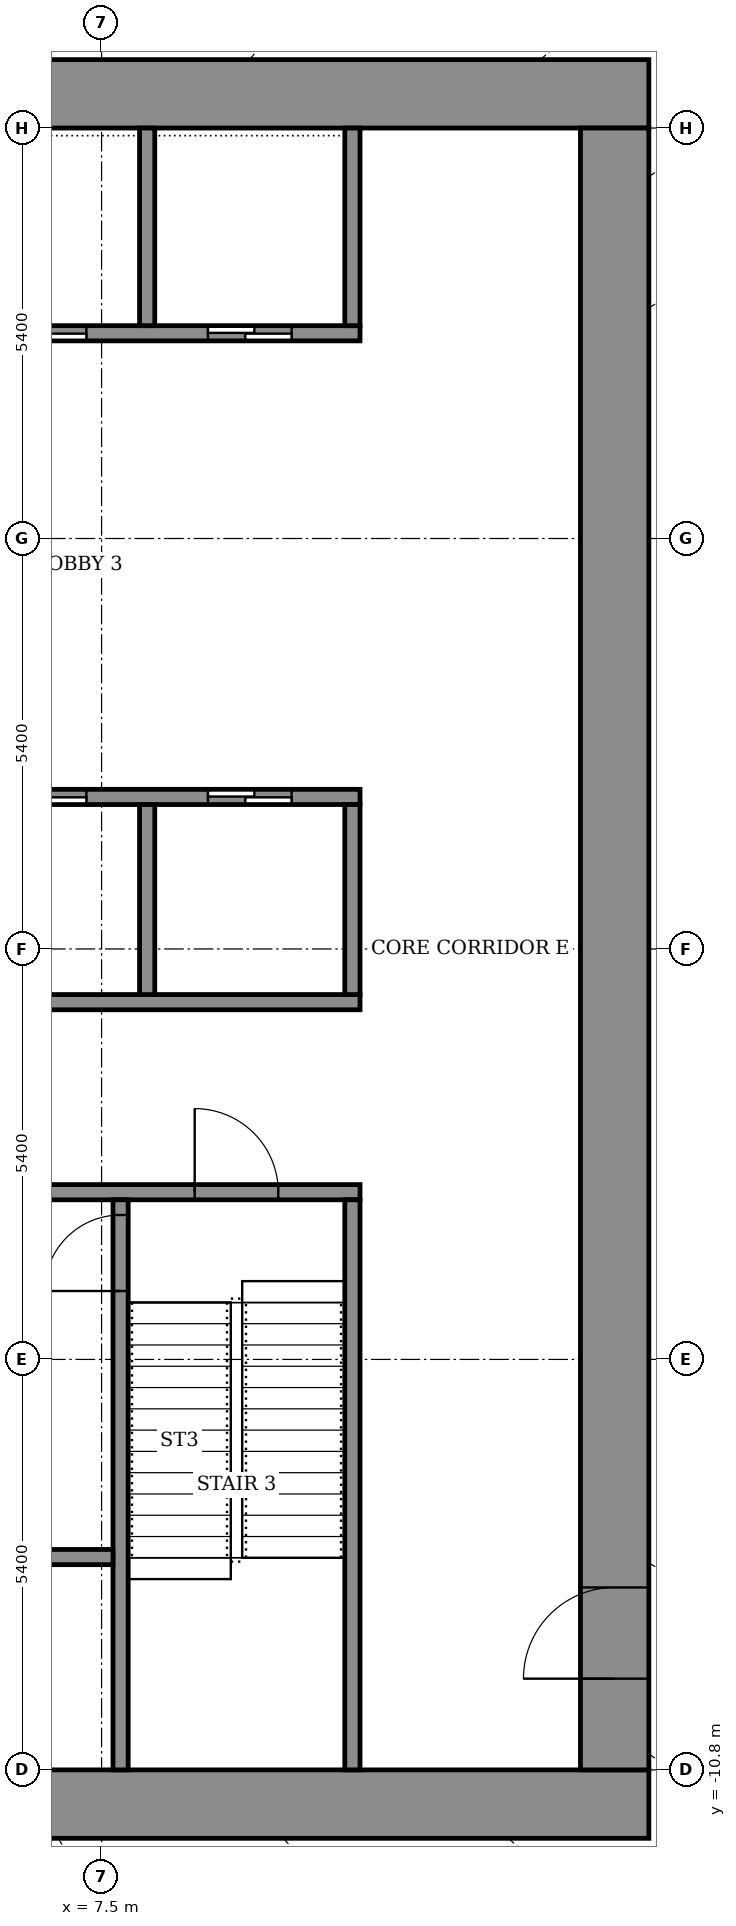
"""IFC4 building model, lengths in metres.
Left out: names, types, materials, properties, quantities, classifications, styles, units other than length and angle.
Written with IfcOpenShell. Run it as: python <this file> out.ifc"""

import sys

from ifc_helpers import new_model, si_unit, direction, frame, frame_2d, origin, place, context, subcontext, project, spatial, rectangle, extrude, element, fill, save


model = new_model("IFC4")
c1 = context("Model", 3, precision=1e-05, world=origin(), true_north=direction((0.0, 1.0)))
c2 = subcontext(c1, "Body", "Model", "MODEL_VIEW")
j1 = project(units=[si_unit("LENGTHUNIT", "METRE"), si_unit("PLANEANGLEUNIT", "RADIAN")], contexts=[c1])
p1 = place(None, origin())
s1 = spatial("IfcSite", under=j1, at=p1, CompositionType="ELEMENT")
p2 = place(p1, origin())
s2 = spatial("IfcBuilding", under=s1, at=p2, CompositionType="ELEMENT")
p3 = place(p2, frame((0.0, 0.0, 148.1)))
s3 = spatial("IfcBuildingStorey", under=s2, at=p3, CompositionType="ELEMENT", Elevation=148.1)
for number, where, z_axis, x_axis in (
    (1, (-14.7, -11.25, 0.0), (0.0, 0.0, 1.0), (1.0, 0.0, 0.0)),
    (2, (-14.7, 11.25, 0.0), (0.0, 0.0, 1.0), (1.0, 0.0, 0.0)),
):
    element("IfcWall", number, at=place(p3, frame(where, z_axis=z_axis, x_axis=x_axis)), inside=s3, PredefinedType="SHEAR", context=c2, shape_type="SweptSolid", body=[
        extrude(rectangle(XDim=29.4, YDim=0.9, at=frame_2d((14.7, 0.0))), origin(), (0.0, 0.0, 1.0), 4.6),
    ])
p4 = place(p3, frame((14.25, -10.8, 0.0), z_axis=(0.0, 0.0, 1.0), x_axis=(0.0, 1.0, 0.0)))
e3 = element("IfcWall", 3, at=p4, inside=s3, PredefinedType="SHEAR", context=c2, shape_type="SweptSolid", body=[
    extrude(rectangle(XDim=21.6, YDim=0.9, at=frame_2d((10.8, 0.0))), origin(), (0.0, 0.0, 1.0), 4.6),
])
p5 = place(p4, frame((1.2, 0.0, 0.0)))
e4 = element("IfcOpeningElement", 4, at=p5, cuts=e3, PredefinedType="OPENING", context=c2, shape_type="SweptSolid", body=[
    extrude(rectangle(XDim=1.2, YDim=2.1, at=frame_2d((0.6, 1.05))), frame((0.0, 0.46, 0.0), z_axis=(0.0, -1.0, 0.0), x_axis=(1.0, 0.0, 0.0)), (0.0, 0.0, 1.0), 0.92),
])
p6 = place(p3, frame((-10.9, -3.2, 0.0), z_axis=(0.0, 0.0, 1.0), x_axis=(1.0, 0.0, 0.0)))
e5 = element("IfcWall", 5, at=p6, inside=s3, PredefinedType="SHEAR", context=c2, shape_type="SweptSolid", body=[
    extrude(rectangle(XDim=21.8, YDim=0.2, at=frame_2d((10.9, 0.0))), origin(), (0.0, 0.0, 1.0), 4.05),
])
p7 = place(p6, frame((1.075, 0.0, 0.0)))
e6 = element("IfcOpeningElement", 6, at=p7, cuts=e5, PredefinedType="OPENING", context=c2, shape_type="SweptSolid", body=[
    extrude(rectangle(XDim=1.1, YDim=2.1, at=frame_2d((0.55, 1.05))), frame((0.0, 0.11, 0.0), z_axis=(0.0, -1.0, 0.0), x_axis=(1.0, 0.0, 0.0)), (0.0, 0.0, 1.0), 0.22),
])
p8 = place(p6, frame((10.325, 0.0, 0.0)))
e7 = element("IfcOpeningElement", 7, at=p8, cuts=e5, PredefinedType="OPENING", context=c2, shape_type="SweptSolid", body=[
    extrude(rectangle(XDim=1.1, YDim=2.1, at=frame_2d((0.55, 1.05))), frame((0.0, 0.11, 0.0), z_axis=(0.0, -1.0, 0.0), x_axis=(1.0, 0.0, 0.0)), (0.0, 0.0, 1.0), 0.22),
])
p9 = place(p6, frame((19.625, 0.0, 0.0)))
e8 = element("IfcOpeningElement", 8, at=p9, cuts=e5, PredefinedType="OPENING", context=c2, shape_type="SweptSolid", body=[
    extrude(rectangle(XDim=1.1, YDim=2.1, at=frame_2d((0.55, 1.05))), frame((0.0, 0.11, 0.0), z_axis=(0.0, -1.0, 0.0), x_axis=(1.0, 0.0, 0.0)), (0.0, 0.0, 1.0), 0.22),
])
p10 = place(p6, frame((5.7, 0.0, 0.0)))
e9 = element("IfcOpeningElement", 9, at=p10, cuts=e5, PredefinedType="OPENING", context=c2, shape_type="SweptSolid", body=[
    extrude(rectangle(XDim=1.1, YDim=2.1, at=frame_2d((0.55, 1.05))), frame((0.0, 0.11, 0.0), z_axis=(0.0, -1.0, 0.0), x_axis=(1.0, 0.0, 0.0)), (0.0, 0.0, 1.0), 0.22),
])
p11 = place(p6, frame((14.975, 0.0, 0.0)))
e10 = element("IfcOpeningElement", 10, at=p11, cuts=e5, PredefinedType="OPENING", context=c2, shape_type="SweptSolid", body=[
    extrude(rectangle(XDim=1.1, YDim=2.1, at=frame_2d((0.55, 1.05))), frame((0.0, 0.11, 0.0), z_axis=(0.0, -1.0, 0.0), x_axis=(1.0, 0.0, 0.0)), (0.0, 0.0, 1.0), 0.22),
])
p12 = place(p3, frame((-10.9, -0.7, 0.0), z_axis=(0.0, 0.0, 1.0), x_axis=(1.0, 0.0, 0.0)))
e11 = element("IfcWall", 11, at=p12, inside=s3, PredefinedType="SHEAR", context=c2, shape_type="SweptSolid", body=[
    extrude(rectangle(XDim=21.8, YDim=0.2, at=frame_2d((10.9, 0.0))), origin(), (0.0, 0.0, 1.0), 4.05),
])
p13 = place(p3, frame((-10.9, 2.0, 0.0), z_axis=(0.0, 0.0, 1.0), x_axis=(1.0, 0.0, 0.0)))
e12 = element("IfcWall", 12, at=p13, inside=s3, PredefinedType="SHEAR", context=c2, shape_type="SweptSolid", body=[
    extrude(rectangle(XDim=21.8, YDim=0.2, at=frame_2d((10.9, 0.0))), origin(), (0.0, 0.0, 1.0), 4.05),
])
p14 = place(p13, frame((14.4, 0.0, 0.0)))
e13 = element("IfcOpeningElement", 13, at=p14, cuts=e12, PredefinedType="OPENING", context=c2, shape_type="SweptSolid", body=[
    extrude(rectangle(XDim=1.1, YDim=2.1, at=frame_2d((0.55, 1.05))), frame((0.0, 0.11, 0.0), z_axis=(0.0, -1.0, 0.0), x_axis=(1.0, 0.0, 0.0)), (0.0, 0.0, 1.0), 0.22),
])
p15 = place(p13, frame((17.1, 0.0, 0.0)))
e14 = element("IfcOpeningElement", 14, at=p15, cuts=e12, PredefinedType="OPENING", context=c2, shape_type="SweptSolid", body=[
    extrude(rectangle(XDim=1.1, YDim=2.1, at=frame_2d((0.55, 1.05))), frame((0.0, 0.11, 0.0), z_axis=(0.0, -1.0, 0.0), x_axis=(1.0, 0.0, 0.0)), (0.0, 0.0, 1.0), 0.22),
])
p16 = place(p13, frame((19.8, 0.0, 0.0)))
e15 = element("IfcOpeningElement", 15, at=p16, cuts=e12, PredefinedType="OPENING", context=c2, shape_type="SweptSolid", body=[
    extrude(rectangle(XDim=1.1, YDim=2.1, at=frame_2d((0.55, 1.05))), frame((0.0, 0.11, 0.0), z_axis=(0.0, -1.0, 0.0), x_axis=(1.0, 0.0, 0.0)), (0.0, 0.0, 1.0), 0.22),
])
p17 = place(p13, frame((2.35, 0.0, 0.0)))
e16 = element("IfcOpeningElement", 16, at=p17, cuts=e12, PredefinedType="OPENING", context=c2, shape_type="SweptSolid", body=[
    extrude(rectangle(XDim=0.9, YDim=2.1, at=frame_2d((0.45, 1.05))), frame((0.0, 0.11, 0.0), z_axis=(0.0, -1.0, 0.0), x_axis=(1.0, 0.0, 0.0)), (0.0, 0.0, 1.0), 0.22),
])
p18 = place(p13, frame((9.1, 0.0, 0.0)))
e17 = element("IfcOpeningElement", 17, at=p18, cuts=e12, PredefinedType="OPENING", context=c2, shape_type="SweptSolid", body=[
    extrude(rectangle(XDim=0.9, YDim=2.1, at=frame_2d((0.45, 1.05))), frame((0.0, 0.11, 0.0), z_axis=(0.0, -1.0, 0.0), x_axis=(1.0, 0.0, 0.0)), (0.0, 0.0, 1.0), 0.22),
])
p19 = place(p3, frame((-10.9, 8.1, 0.0), z_axis=(0.0, 0.0, 1.0), x_axis=(1.0, 0.0, 0.0)))
e18 = element("IfcWall", 18, at=p19, inside=s3, PredefinedType="SHEAR", context=c2, shape_type="SweptSolid", body=[
    extrude(rectangle(XDim=21.8, YDim=0.2, at=frame_2d((10.9, 0.0))), origin(), (0.0, 0.0, 1.0), 4.05),
])
p20 = place(p19, frame((14.4, 0.0, 0.0)))
e19 = element("IfcOpeningElement", 19, at=p20, cuts=e18, PredefinedType="OPENING", context=c2, shape_type="SweptSolid", body=[
    extrude(rectangle(XDim=1.1, YDim=2.1, at=frame_2d((0.55, 1.05))), frame((0.0, 0.11, 0.0), z_axis=(0.0, -1.0, 0.0), x_axis=(1.0, 0.0, 0.0)), (0.0, 0.0, 1.0), 0.22),
])
p21 = place(p19, frame((17.1, 0.0, 0.0)))
e20 = element("IfcOpeningElement", 20, at=p21, cuts=e18, PredefinedType="OPENING", context=c2, shape_type="SweptSolid", body=[
    extrude(rectangle(XDim=1.1, YDim=2.1, at=frame_2d((0.55, 1.05))), frame((0.0, 0.11, 0.0), z_axis=(0.0, -1.0, 0.0), x_axis=(1.0, 0.0, 0.0)), (0.0, 0.0, 1.0), 0.22),
])
p22 = place(p19, frame((19.8, 0.0, 0.0)))
e21 = element("IfcOpeningElement", 21, at=p22, cuts=e18, PredefinedType="OPENING", context=c2, shape_type="SweptSolid", body=[
    extrude(rectangle(XDim=1.1, YDim=2.1, at=frame_2d((0.55, 1.05))), frame((0.0, 0.11, 0.0), z_axis=(0.0, -1.0, 0.0), x_axis=(1.0, 0.0, 0.0)), (0.0, 0.0, 1.0), 0.22),
])
p23 = place(p19, frame((2.35, 0.0, 0.0)))
e22 = element("IfcOpeningElement", 22, at=p23, cuts=e18, PredefinedType="OPENING", context=c2, shape_type="SweptSolid", body=[
    extrude(rectangle(XDim=0.9, YDim=2.1, at=frame_2d((0.45, 1.05))), frame((0.0, 0.11, 0.0), z_axis=(0.0, -1.0, 0.0), x_axis=(1.0, 0.0, 0.0)), (0.0, 0.0, 1.0), 0.22),
])
p24 = place(p19, frame((9.1, 0.0, 0.0)))
e23 = element("IfcOpeningElement", 23, at=p24, cuts=e18, PredefinedType="OPENING", context=c2, shape_type="SweptSolid", body=[
    extrude(rectangle(XDim=0.9, YDim=2.1, at=frame_2d((0.45, 1.05))), frame((0.0, 0.11, 0.0), z_axis=(0.0, -1.0, 0.0), x_axis=(1.0, 0.0, 0.0)), (0.0, 0.0, 1.0), 0.22),
])
p25 = place(p3, frame((7.75, -10.8, 0.0), z_axis=(0.0, 0.0, 1.0), x_axis=(0.0, 1.0, 0.0)))
e24 = element("IfcWall", 24, at=p25, inside=s3, PredefinedType="SHEAR", context=c2, shape_type="SweptSolid", body=[
    extrude(rectangle(XDim=7.5, YDim=0.2, at=frame_2d((3.75, 0.0))), origin(), (0.0, 0.0, 1.0), 4.05),
])
p26 = place(p25, frame((6.3, 0.0, 0.0)))
e25 = element("IfcOpeningElement", 25, at=p26, cuts=e24, PredefinedType="OPENING", context=c2, shape_type="SweptSolid", body=[
    extrude(rectangle(XDim=1.0, YDim=2.1, at=frame_2d((0.5, 1.05))), frame((0.0, 0.11, 0.0), z_axis=(0.0, -1.0, 0.0), x_axis=(1.0, 0.0, 0.0)), (0.0, 0.0, 1.0), 0.22),
])
p27 = place(p3, frame((10.8, -10.8, 0.0), z_axis=(0.0, 0.0, 1.0), x_axis=(0.0, 1.0, 0.0)))
e26 = element("IfcWall", 26, at=p27, inside=s3, PredefinedType="SHEAR", context=c2, shape_type="SweptSolid", body=[
    extrude(rectangle(XDim=7.5, YDim=0.2, at=frame_2d((3.75, 0.0))), origin(), (0.0, 0.0, 1.0), 4.05),
])
p28 = place(p3, frame((1.6, -8.0, 0.0), z_axis=(0.0, 0.0, 1.0), x_axis=(1.0, 0.0, 0.0)))
e27 = element("IfcWall", 27, at=p28, inside=s3, PredefinedType="SHEAR", context=c2, shape_type="SweptSolid", body=[
    extrude(rectangle(XDim=6.05, YDim=0.2, at=frame_2d((3.025, 0.0))), origin(), (0.0, 0.0, 1.0), 4.05),
])
p29 = place(p28, frame((0.913, 0.0, 0.0)))
e28 = element("IfcOpeningElement", 28, at=p29, cuts=e27, PredefinedType="OPENING", context=c2, shape_type="SweptSolid", body=[
    extrude(rectangle(XDim=1.1, YDim=2.1, at=frame_2d((0.55, 1.05))), frame((0.0, 0.11, 0.0), z_axis=(0.0, -1.0, 0.0), x_axis=(1.0, 0.0, 0.0)), (0.0, 0.0, 1.0), 0.22),
])
p30 = place(p28, frame((4.038, 0.0, 0.0)))
e29 = element("IfcOpeningElement", 29, at=p30, cuts=e27, PredefinedType="OPENING", context=c2, shape_type="SweptSolid", body=[
    extrude(rectangle(XDim=1.1, YDim=2.1, at=frame_2d((0.55, 1.05))), frame((0.0, 0.11, 0.0), z_axis=(0.0, -1.0, 0.0), x_axis=(1.0, 0.0, 0.0)), (0.0, 0.0, 1.0), 0.22),
])
for number, where, z_axis, x_axis in (
    (30, (8.1, -0.6, 0.0), (0.0, 0.0, 1.0), (0.0, 1.0, 0.0)),
    (31, (10.8, -0.6, 0.0), (0.0, 0.0, 1.0), (0.0, 1.0, 0.0)),
):
    element("IfcWall", number, at=place(p3, frame(where, z_axis=z_axis, x_axis=x_axis)), inside=s3, PredefinedType="SHEAR", context=c2, shape_type="SweptSolid", body=[
        extrude(rectangle(XDim=2.5, YDim=0.2, at=frame_2d((1.25, 0.0))), origin(), (0.0, 0.0, 1.0), 4.05),
    ])
for number, where, z_axis, x_axis in (
    (32, (8.1, 8.2, 0.0), (0.0, 0.0, 1.0), (0.0, 1.0, 0.0)),
    (33, (10.8, 8.2, 0.0), (0.0, 0.0, 1.0), (0.0, 1.0, 0.0)),
):
    element("IfcWall", number, at=place(p3, frame(where, z_axis=z_axis, x_axis=x_axis)), inside=s3, PredefinedType="SHEAR", context=c2, shape_type="SweptSolid", body=[
        extrude(rectangle(XDim=2.6, YDim=0.2, at=frame_2d((1.3, 0.0))), origin(), (0.0, 0.0, 1.0), 4.05),
    ])
p31 = place(p5, origin())
e34 = element("IfcDoor", 34, at=p31, inside=s3, OperationType="DOUBLE_DOOR_SINGLE_SWING", PredefinedType="DOOR", context=c2, shape_type="SweptSolid", body=[
    extrude(rectangle(XDim=1.2, YDim=2.1, at=frame_2d((0.6, 1.05))), frame((0.0, 0.025, 0.0), z_axis=(0.0, -1.0, 0.0), x_axis=(1.0, 0.0, 0.0)), (0.0, 0.0, 1.0), 0.05),
])
fill(e4, e34)
p32 = place(p15, origin())
e35 = element("IfcDoor", 35, at=p32, inside=s3, OperationType="SLIDING_TO_LEFT", PredefinedType="DOOR", context=c2, shape_type="SweptSolid", body=[
    extrude(rectangle(XDim=1.1, YDim=2.1, at=frame_2d((0.55, 1.05))), frame((0.0, 0.025, 0.0), z_axis=(0.0, -1.0, 0.0), x_axis=(1.0, 0.0, 0.0)), (0.0, 0.0, 1.0), 0.05),
])
fill(e14, e35)
p33 = place(p16, origin())
e36 = element("IfcDoor", 36, at=p33, inside=s3, OperationType="SLIDING_TO_LEFT", PredefinedType="DOOR", context=c2, shape_type="SweptSolid", body=[
    extrude(rectangle(XDim=1.1, YDim=2.1, at=frame_2d((0.55, 1.05))), frame((0.0, 0.025, 0.0), z_axis=(0.0, -1.0, 0.0), x_axis=(1.0, 0.0, 0.0)), (0.0, 0.0, 1.0), 0.05),
])
fill(e15, e36)
p34 = place(p21, origin())
e37 = element("IfcDoor", 37, at=p34, inside=s3, OperationType="SLIDING_TO_LEFT", PredefinedType="DOOR", context=c2, shape_type="SweptSolid", body=[
    extrude(rectangle(XDim=1.1, YDim=2.1, at=frame_2d((0.55, 1.05))), frame((0.0, 0.025, 0.0), z_axis=(0.0, -1.0, 0.0), x_axis=(1.0, 0.0, 0.0)), (0.0, 0.0, 1.0), 0.05),
])
fill(e20, e37)
p35 = place(p22, origin())
e38 = element("IfcDoor", 38, at=p35, inside=s3, OperationType="SLIDING_TO_LEFT", PredefinedType="DOOR", context=c2, shape_type="SweptSolid", body=[
    extrude(rectangle(XDim=1.1, YDim=2.1, at=frame_2d((0.55, 1.05))), frame((0.0, 0.025, 0.0), z_axis=(0.0, -1.0, 0.0), x_axis=(1.0, 0.0, 0.0)), (0.0, 0.0, 1.0), 0.05),
])
fill(e21, e38)
p36 = place(p9, origin())
e39 = element("IfcDoor", 39, at=p36, inside=s3, OperationType="SINGLE_SWING_RIGHT", PredefinedType="DOOR", context=c2, shape_type="SweptSolid", body=[
    extrude(rectangle(XDim=1.1, YDim=2.1, at=frame_2d((0.55, 1.05))), frame((0.0, 0.025, 0.0), z_axis=(0.0, -1.0, 0.0), x_axis=(1.0, 0.0, 0.0)), (0.0, 0.0, 1.0), 0.05),
])
fill(e8, e39)
p37 = place(p26, origin())
e40 = element("IfcDoor", 40, at=p37, inside=s3, OperationType="SINGLE_SWING_RIGHT", PredefinedType="DOOR", context=c2, shape_type="SweptSolid", body=[
    extrude(rectangle(XDim=1.0, YDim=2.1, at=frame_2d((0.5, 1.05))), frame((0.0, 0.025, 0.0), z_axis=(0.0, -1.0, 0.0), x_axis=(1.0, 0.0, 0.0)), (0.0, 0.0, 1.0), 0.05),
])
fill(e25, e40)
save(model, sys.argv[1])
